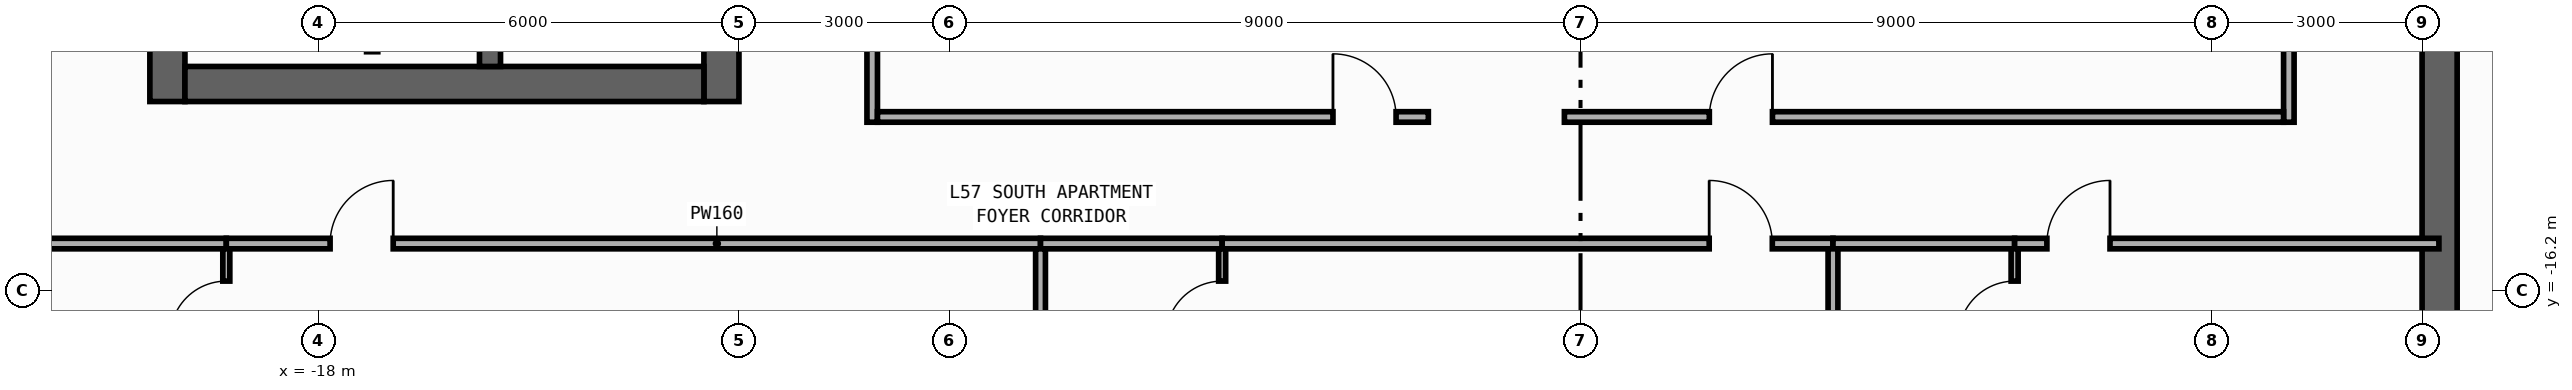
"""IFC4 building model, lengths in metres.
Left out: names, types, materials, properties, quantities, classifications, styles, units other than length and angle.
Written with IfcOpenShell. Run it as: python <this file> out.ifc"""

import sys

from ifc_helpers import new_model, si_unit, direction, frame, frame_2d, origin, place, context, subcontext, project, spatial, rectangle, extrude, element, fill, save


model = new_model("IFC4")
c1 = context("Model", 3, precision=1e-05, world=origin(), true_north=direction((0.0, 1.0)))
c2 = subcontext(c1, "Body", "Model", "MODEL_VIEW")
j1 = project(units=[si_unit("LENGTHUNIT", "METRE"), si_unit("PLANEANGLEUNIT", "RADIAN")], contexts=[c1])
p1 = place(None, origin())
s1 = spatial("IfcSite", under=j1, at=p1, CompositionType="ELEMENT")
p2 = place(p1, origin())
s2 = spatial("IfcBuilding", under=s1, at=p2, CompositionType="ELEMENT")
p3 = place(p2, frame((0.0, 0.0, 244.0)))
s3 = spatial("IfcBuildingStorey", under=s2, at=p3, CompositionType="ELEMENT", Elevation=244.0)
p4 = place(p3, frame((-20.15, -13.5, 0.0), z_axis=(0.0, 0.0, 1.0), x_axis=(0.0, 1.0, 0.0)))
e1 = element("IfcWall", 1, at=p4, inside=s3, PredefinedType="SHEAR", context=c2, shape_type="SweptSolid", body=[
    extrude(rectangle(XDim=27.0, YDim=0.5, at=frame_2d((13.5, 0.0))), origin(), (0.0, 0.0, 1.0), 3.34),
])
p5 = place(p3, frame((-12.25, -13.5, 0.0), z_axis=(0.0, 0.0, 1.0), x_axis=(0.0, 1.0, 0.0)))
e2 = element("IfcWall", 2, at=p5, inside=s3, PredefinedType="SHEAR", context=c2, shape_type="SweptSolid", body=[
    extrude(rectangle(XDim=27.0, YDim=0.5, at=frame_2d((13.5, 0.0))), origin(), (0.0, 0.0, 1.0), 3.34),
])
p6 = place(p5, frame((15.175, 0.0, 0.0)))
e3 = element("IfcOpeningElement", 3, at=p6, cuts=e2, PredefinedType="OPENING", context=c2, shape_type="SweptSolid", body=[
    extrude(rectangle(XDim=0.85, YDim=2.1, at=frame_2d((0.425, 1.05))), frame((0.0, 0.26, 0.0), z_axis=(0.0, -1.0, 0.0), x_axis=(1.0, 0.0, 0.0)), (0.0, 0.0, 1.0), 0.52),
])
p7 = place(p5, frame((21.275, 0.0, 0.0)))
e4 = element("IfcOpeningElement", 4, at=p7, cuts=e2, PredefinedType="OPENING", context=c2, shape_type="SweptSolid", body=[
    extrude(rectangle(XDim=0.85, YDim=2.1, at=frame_2d((0.425, 1.05))), frame((0.0, 0.26, 0.0), z_axis=(0.0, -1.0, 0.0), x_axis=(1.0, 0.0, 0.0)), (0.0, 0.0, 1.0), 0.52),
])
p8 = place(p5, frame((4.275, 0.0, 0.0)))
e5 = element("IfcOpeningElement", 5, at=p8, cuts=e2, PredefinedType="OPENING", context=c2, shape_type="SweptSolid", body=[
    extrude(rectangle(XDim=0.85, YDim=2.1, at=frame_2d((0.425, 1.05))), frame((0.0, 0.26, 0.0), z_axis=(0.0, -1.0, 0.0), x_axis=(1.0, 0.0, 0.0)), (0.0, 0.0, 1.0), 0.52),
])
p9 = place(p5, frame((10.275, 0.0, 0.0)))
e6 = element("IfcOpeningElement", 6, at=p9, cuts=e2, PredefinedType="OPENING", context=c2, shape_type="SweptSolid", body=[
    extrude(rectangle(XDim=0.85, YDim=2.1, at=frame_2d((0.425, 1.05))), frame((0.0, 0.26, 0.0), z_axis=(0.0, -1.0, 0.0), x_axis=(1.0, 0.0, 0.0)), (0.0, 0.0, 1.0), 0.52),
])
p10 = place(p5, frame((12.725, 0.0, 0.0)))
e7 = element("IfcOpeningElement", 7, at=p10, cuts=e2, PredefinedType="OPENING", context=c2, shape_type="SweptSolid", body=[
    extrude(rectangle(XDim=1.15, YDim=2.2, at=frame_2d((0.575, 1.1))), frame((0.0, 0.26, 0.0), z_axis=(0.0, -1.0, 0.0), x_axis=(1.0, 0.0, 0.0)), (0.0, 0.0, 1.0), 0.52),
])
p11 = place(p5, frame((1.625, 0.0, 0.0)))
e8 = element("IfcOpeningElement", 8, at=p11, cuts=e2, PredefinedType="OPENING", context=c2, shape_type="SweptSolid", body=[
    extrude(rectangle(XDim=0.85, YDim=2.1, at=frame_2d((0.425, 1.05))), frame((0.0, 0.26, 0.0), z_axis=(0.0, -1.0, 0.0), x_axis=(1.0, 0.0, 0.0)), (0.0, 0.0, 1.0), 0.52),
])
p12 = place(p3, frame((-19.9, -13.25, 0.0), z_axis=(0.0, 0.0, 1.0), x_axis=(1.0, 0.0, 0.0)))
e9 = element("IfcWall", 9, at=p12, inside=s3, PredefinedType="SHEAR", context=c2, shape_type="SweptSolid", body=[
    extrude(rectangle(XDim=7.4, YDim=0.5, at=frame_2d((3.7, 0.0))), origin(), (0.0, 0.0, 1.0), 3.34),
])
p13 = place(p3, frame((-15.55, -13.0, 0.0), z_axis=(0.0, 0.0, 1.0), x_axis=(0.0, 1.0, 0.0)))
e10 = element("IfcWall", 10, at=p13, inside=s3, PredefinedType="SHEAR", context=c2, shape_type="SweptSolid", body=[
    extrude(rectangle(XDim=26.0, YDim=0.3, at=frame_2d((13.0, 0.0))), origin(), (0.0, 0.0, 1.0), 3.34),
])
p14 = place(p13, frame((12.225, 0.0, 0.0)))
e11 = element("IfcOpeningElement", 11, at=p14, cuts=e10, PredefinedType="OPENING", context=c2, shape_type="SweptSolid", body=[
    extrude(rectangle(XDim=1.15, YDim=2.2, at=frame_2d((0.575, 1.1))), frame((0.0, 0.16, 0.0), z_axis=(0.0, -1.0, 0.0), x_axis=(1.0, 0.0, 0.0)), (0.0, 0.0, 1.0), 0.32),
])
p15 = place(p13, frame((1.125, 0.0, 0.0)))
e12 = element("IfcOpeningElement", 12, at=p15, cuts=e10, PredefinedType="OPENING", context=c2, shape_type="SweptSolid", body=[
    extrude(rectangle(XDim=0.85, YDim=2.1, at=frame_2d((0.425, 1.05))), frame((0.0, 0.16, 0.0), z_axis=(0.0, -1.0, 0.0), x_axis=(1.0, 0.0, 0.0)), (0.0, 0.0, 1.0), 0.32),
])
p16 = place(p3, frame((12.25, -19.8, 0.0), z_axis=(0.0, 0.0, 1.0), x_axis=(0.0, 1.0, 0.0)))
e13 = element("IfcWall", 13, at=p16, inside=s3, PredefinedType="SHEAR", context=c2, shape_type="SweptSolid", body=[
    extrude(rectangle(XDim=27.0, YDim=0.5, at=frame_2d((13.5, 0.0))), origin(), (0.0, 0.0, 1.0), 3.34),
])
p17 = place(p16, frame((23.05, 0.0, 0.0)))
e14 = element("IfcOpeningElement", 14, at=p17, cuts=e13, PredefinedType="OPENING", context=c2, shape_type="SweptSolid", body=[
    extrude(rectangle(XDim=1.1, YDim=2.2, at=frame_2d((0.55, 1.1))), frame((0.0, 0.26, 0.0), z_axis=(0.0, -1.0, 0.0), x_axis=(1.0, 0.0, 0.0)), (0.0, 0.0, 1.0), 0.52),
])
p18 = place(p16, frame((19.85, 0.0, 0.0)))
e15 = element("IfcOpeningElement", 15, at=p18, cuts=e13, PredefinedType="OPENING", context=c2, shape_type="SweptSolid", body=[
    extrude(rectangle(XDim=1.1, YDim=2.2, at=frame_2d((0.55, 1.1))), frame((0.0, 0.26, 0.0), z_axis=(0.0, -1.0, 0.0), x_axis=(1.0, 0.0, 0.0)), (0.0, 0.0, 1.0), 0.52),
])
p19 = place(p16, frame((16.65, 0.0, 0.0)))
e16 = element("IfcOpeningElement", 16, at=p19, cuts=e13, PredefinedType="OPENING", context=c2, shape_type="SweptSolid", body=[
    extrude(rectangle(XDim=1.1, YDim=2.2, at=frame_2d((0.55, 1.1))), frame((0.0, 0.26, 0.0), z_axis=(0.0, -1.0, 0.0), x_axis=(1.0, 0.0, 0.0)), (0.0, 0.0, 1.0), 0.52),
])
p20 = place(p16, frame((10.175, 0.0, 0.0)))
e17 = element("IfcOpeningElement", 17, at=p20, cuts=e13, PredefinedType="OPENING", context=c2, shape_type="SweptSolid", body=[
    extrude(rectangle(XDim=0.85, YDim=2.1, at=frame_2d((0.425, 1.05))), frame((0.0, 0.26, 0.0), z_axis=(0.0, -1.0, 0.0), x_axis=(1.0, 0.0, 0.0)), (0.0, 0.0, 1.0), 0.52),
])
p21 = place(p16, frame((12.725, 0.0, 0.0)))
e18 = element("IfcOpeningElement", 18, at=p21, cuts=e13, PredefinedType="OPENING", context=c2, shape_type="SweptSolid", body=[
    extrude(rectangle(XDim=1.15, YDim=2.2, at=frame_2d((0.575, 1.1))), frame((0.0, 0.26, 0.0), z_axis=(0.0, -1.0, 0.0), x_axis=(1.0, 0.0, 0.0)), (0.0, 0.0, 1.0), 0.52),
])
p22 = place(p16, frame((25.125, 0.0, 0.0)))
e19 = element("IfcOpeningElement", 19, at=p22, cuts=e13, PredefinedType="OPENING", context=c2, shape_type="SweptSolid", body=[
    extrude(rectangle(XDim=0.85, YDim=2.1, at=frame_2d((0.425, 1.05))), frame((0.0, 0.26, 0.0), z_axis=(0.0, -1.0, 0.0), x_axis=(1.0, 0.0, 0.0)), (0.0, 0.0, 1.0), 0.52),
])
p23 = place(p3, frame((-10.1, -13.795, 0.0), z_axis=(0.0, 0.0, 1.0), x_axis=(0.0, 1.0, 0.0)))
e20 = element("IfcWall", 20, at=p23, inside=s3, PredefinedType="PARTITIONING", context=c2, shape_type="SweptSolid", body=[
    extrude(rectangle(XDim=11.205, YDim=0.15, at=frame_2d((5.603, 0.0))), origin(), (0.0, 0.0, 1.0), 3.34),
])
p24 = place(p23, frame((8.009, 0.0, 0.0)))
e21 = element("IfcOpeningElement", 21, at=p24, cuts=e20, PredefinedType="OPENING", context=c2, shape_type="SweptSolid", body=[
    extrude(rectangle(XDim=0.9, YDim=2.15, at=frame_2d((0.45, 1.075))), frame((0.0, 0.085, 0.0), z_axis=(0.0, -1.0, 0.0), x_axis=(1.0, 0.0, 0.0)), (0.0, 0.0, 1.0), 0.17),
])
p25 = place(p3, frame((10.1, -13.795, 0.0), z_axis=(0.0, 0.0, 1.0), x_axis=(0.0, 1.0, 0.0)))
e22 = element("IfcWall", 22, at=p25, inside=s3, PredefinedType="PARTITIONING", context=c2, shape_type="SweptSolid", body=[
    extrude(rectangle(XDim=8.575, YDim=0.15, at=frame_2d((4.288, 0.0))), origin(), (0.0, 0.0, 1.0), 3.34),
])
p26 = place(p25, frame((7.215, 0.0, 0.0)))
e23 = element("IfcOpeningElement", 23, at=p26, cuts=e22, PredefinedType="OPENING", context=c2, shape_type="SweptSolid", body=[
    extrude(rectangle(XDim=0.9, YDim=2.15, at=frame_2d((0.45, 1.075))), frame((0.0, 0.085, 0.0), z_axis=(0.0, -1.0, 0.0), x_axis=(1.0, 0.0, 0.0)), (0.0, 0.0, 1.0), 0.17),
])
p27 = place(p3, frame((-21.955, -15.525, 0.0), z_axis=(0.0, 0.0, 1.0), x_axis=(1.0, 0.0, 0.0)))
e24 = element("IfcWall", 24, at=p27, inside=s3, PredefinedType="PARTITIONING", context=c2, shape_type="SweptSolid", body=[
    extrude(rectangle(XDim=2.645, YDim=0.15, at=frame_2d((1.323, 0.0))), origin(), (0.0, 0.0, 1.0), 3.34),
])
p28 = place(p3, frame((-19.31, -15.525, 0.0), z_axis=(0.0, 0.0, 1.0), x_axis=(1.0, 0.0, 0.0)))
e25 = element("IfcWall", 25, at=p28, inside=s3, PredefinedType="PARTITIONING", context=c2, shape_type="SweptSolid", body=[
    extrude(rectangle(XDim=11.61, YDim=0.15, at=frame_2d((5.805, 0.0))), origin(), (0.0, 0.0, 1.0), 3.34),
])
p29 = place(p28, frame((1.48, 0.0, 0.0)))
e26 = element("IfcOpeningElement", 26, at=p29, cuts=e25, PredefinedType="OPENING", context=c2, shape_type="SweptSolid", body=[
    extrude(rectangle(XDim=0.9, YDim=2.15, at=frame_2d((0.45, 1.075))), frame((0.0, 0.085, 0.0), z_axis=(0.0, -1.0, 0.0), x_axis=(1.0, 0.0, 0.0)), (0.0, 0.0, 1.0), 0.17),
])
p30 = place(p3, frame((-7.7, -15.525, 0.0), z_axis=(0.0, 0.0, 1.0), x_axis=(1.0, 0.0, 0.0)))
e27 = element("IfcWall", 27, at=p30, inside=s3, PredefinedType="PARTITIONING", context=c2, shape_type="SweptSolid", body=[
    extrude(rectangle(XDim=2.59, YDim=0.15, at=frame_2d((1.295, 0.0))), origin(), (0.0, 0.0, 1.0), 3.34),
])
p31 = place(p3, frame((-5.11, -15.525, 0.0), z_axis=(0.0, 0.0, 1.0), x_axis=(1.0, 0.0, 0.0)))
e28 = element("IfcWall", 28, at=p31, inside=s3, PredefinedType="PARTITIONING", context=c2, shape_type="SweptSolid", body=[
    extrude(rectangle(XDim=8.71, YDim=0.15, at=frame_2d((4.355, 0.0))), origin(), (0.0, 0.0, 1.0), 3.34),
])
p32 = place(p31, frame((6.945, 0.0, 0.0)))
e29 = element("IfcOpeningElement", 29, at=p32, cuts=e28, PredefinedType="OPENING", context=c2, shape_type="SweptSolid", body=[
    extrude(rectangle(XDim=0.9, YDim=2.15, at=frame_2d((0.45, 1.075))), frame((0.0, 0.085, 0.0), z_axis=(0.0, -1.0, 0.0), x_axis=(1.0, 0.0, 0.0)), (0.0, 0.0, 1.0), 0.17),
])
p33 = place(p3, frame((3.6, -15.525, 0.0), z_axis=(0.0, 0.0, 1.0), x_axis=(1.0, 0.0, 0.0)))
e30 = element("IfcWall", 30, at=p33, inside=s3, PredefinedType="PARTITIONING", context=c2, shape_type="SweptSolid", body=[
    extrude(rectangle(XDim=2.59, YDim=0.15, at=frame_2d((1.295, 0.0))), origin(), (0.0, 0.0, 1.0), 3.34),
])
p34 = place(p3, frame((6.19, -15.525, 0.0), z_axis=(0.0, 0.0, 1.0), x_axis=(1.0, 0.0, 0.0)))
e31 = element("IfcWall", 31, at=p34, inside=s3, PredefinedType="PARTITIONING", context=c2, shape_type="SweptSolid", body=[
    extrude(rectangle(XDim=6.05, YDim=0.15, at=frame_2d((3.025, 0.0))), origin(), (0.0, 0.0, 1.0), 3.34),
])
p35 = place(p34, frame((0.46, 0.0, 0.0)))
e32 = element("IfcOpeningElement", 32, at=p35, cuts=e31, PredefinedType="OPENING", context=c2, shape_type="SweptSolid", body=[
    extrude(rectangle(XDim=0.9, YDim=2.15, at=frame_2d((0.45, 1.075))), frame((0.0, 0.085, 0.0), z_axis=(0.0, -1.0, 0.0), x_axis=(1.0, 0.0, 0.0)), (0.0, 0.0, 1.0), 0.17),
])
p36 = place(p3, frame((-10.025, -13.72, 0.0), z_axis=(0.0, 0.0, 1.0), x_axis=(1.0, 0.0, 0.0)))
e33 = element("IfcWall", 33, at=p36, inside=s3, PredefinedType="PARTITIONING", context=c2, shape_type="SweptSolid", body=[
    extrude(rectangle(XDim=7.855, YDim=0.15, at=frame_2d((3.927, 0.0))), origin(), (0.0, 0.0, 1.0), 3.34),
])
p37 = place(p36, frame((6.495, 0.0, 0.0)))
e34 = element("IfcOpeningElement", 34, at=p37, cuts=e33, PredefinedType="OPENING", context=c2, shape_type="SweptSolid", body=[
    extrude(rectangle(XDim=0.9, YDim=2.15, at=frame_2d((0.45, 1.075))), frame((0.0, 0.085, 0.0), z_axis=(0.0, -1.0, 0.0), x_axis=(1.0, 0.0, 0.0)), (0.0, 0.0, 1.0), 0.17),
])
p38 = place(p3, frame((-0.23, -13.72, 0.0), z_axis=(0.0, 0.0, 1.0), x_axis=(1.0, 0.0, 0.0)))
e35 = element("IfcWall", 35, at=p38, inside=s3, PredefinedType="PARTITIONING", context=c2, shape_type="SweptSolid", body=[
    extrude(rectangle(XDim=10.255, YDim=0.15, at=frame_2d((5.127, 0.0))), origin(), (0.0, 0.0, 1.0), 3.34),
])
p39 = place(p38, frame((2.067, 0.0, 0.0)))
e36 = element("IfcOpeningElement", 36, at=p39, cuts=e35, PredefinedType="OPENING", context=c2, shape_type="SweptSolid", body=[
    extrude(rectangle(XDim=0.9, YDim=2.15, at=frame_2d((0.45, 1.075))), frame((0.0, 0.085, 0.0), z_axis=(0.0, -1.0, 0.0), x_axis=(1.0, 0.0, 0.0)), (0.0, 0.0, 1.0), 0.17),
])
p40 = place(p3, frame((-19.31, -18.1, 0.0), z_axis=(0.0, 0.0, 1.0), x_axis=(0.0, 1.0, 0.0)))
e37 = element("IfcWall", 37, at=p40, inside=s3, PredefinedType="PARTITIONING", context=c2, shape_type="SweptSolid", body=[
    extrude(rectangle(XDim=2.5, YDim=0.1, at=frame_2d((1.25, 0.0))), origin(), (0.0, 0.0, 1.0), 3.34),
])
p41 = place(p40, frame((1.24, 0.0, 0.0)))
e38 = element("IfcOpeningElement", 38, at=p41, cuts=e37, PredefinedType="OPENING", context=c2, shape_type="SweptSolid", body=[
    extrude(rectangle(XDim=0.8, YDim=2.1, at=frame_2d((0.4, 1.05))), frame((0.0, 0.06, 0.0), z_axis=(0.0, -1.0, 0.0), x_axis=(1.0, 0.0, 0.0)), (0.0, 0.0, 1.0), 0.12),
])
p42 = place(p3, frame((-7.7, -18.1, 0.0), z_axis=(0.0, 0.0, 1.0), x_axis=(0.0, 1.0, 0.0)))
e39 = element("IfcWall", 39, at=p42, inside=s3, PredefinedType="PARTITIONING", context=c2, shape_type="SweptSolid", body=[
    extrude(rectangle(XDim=2.5, YDim=0.14, at=frame_2d((1.25, 0.0))), origin(), (0.0, 0.0, 1.0), 3.34),
])
p43 = place(p3, frame((-5.11, -18.1, 0.0), z_axis=(0.0, 0.0, 1.0), x_axis=(0.0, 1.0, 0.0)))
e40 = element("IfcWall", 40, at=p43, inside=s3, PredefinedType="PARTITIONING", context=c2, shape_type="SweptSolid", body=[
    extrude(rectangle(XDim=2.5, YDim=0.1, at=frame_2d((1.25, 0.0))), origin(), (0.0, 0.0, 1.0), 3.34),
])
p44 = place(p43, frame((1.24, 0.0, 0.0)))
e41 = element("IfcOpeningElement", 41, at=p44, cuts=e40, PredefinedType="OPENING", context=c2, shape_type="SweptSolid", body=[
    extrude(rectangle(XDim=0.8, YDim=2.1, at=frame_2d((0.4, 1.05))), frame((0.0, 0.06, 0.0), z_axis=(0.0, -1.0, 0.0), x_axis=(1.0, 0.0, 0.0)), (0.0, 0.0, 1.0), 0.12),
])
p45 = place(p3, frame((3.6, -18.1, 0.0), z_axis=(0.0, 0.0, 1.0), x_axis=(0.0, 1.0, 0.0)))
e42 = element("IfcWall", 42, at=p45, inside=s3, PredefinedType="PARTITIONING", context=c2, shape_type="SweptSolid", body=[
    extrude(rectangle(XDim=2.5, YDim=0.14, at=frame_2d((1.25, 0.0))), origin(), (0.0, 0.0, 1.0), 3.34),
])
p46 = place(p3, frame((6.19, -18.1, 0.0), z_axis=(0.0, 0.0, 1.0), x_axis=(0.0, 1.0, 0.0)))
e43 = element("IfcWall", 43, at=p46, inside=s3, PredefinedType="PARTITIONING", context=c2, shape_type="SweptSolid", body=[
    extrude(rectangle(XDim=2.5, YDim=0.1, at=frame_2d((1.25, 0.0))), origin(), (0.0, 0.0, 1.0), 3.34),
])
p47 = place(p46, frame((1.24, 0.0, 0.0)))
e44 = element("IfcOpeningElement", 44, at=p47, cuts=e43, PredefinedType="OPENING", context=c2, shape_type="SweptSolid", body=[
    extrude(rectangle(XDim=0.8, YDim=2.1, at=frame_2d((0.4, 1.05))), frame((0.0, 0.06, 0.0), z_axis=(0.0, -1.0, 0.0), x_axis=(1.0, 0.0, 0.0)), (0.0, 0.0, 1.0), 0.12),
])
p48 = place(p29, origin())
e45 = element("IfcDoor", 45, at=p48, inside=s3, OperationType="SINGLE_SWING_RIGHT", PredefinedType="DOOR", context=c2, shape_type="SweptSolid", body=[
    extrude(rectangle(XDim=0.9, YDim=2.15, at=frame_2d((0.45, 1.075))), frame((0.0, 0.025, 0.0), z_axis=(0.0, -1.0, 0.0), x_axis=(1.0, 0.0, 0.0)), (0.0, 0.0, 1.0), 0.05),
])
fill(e26, e45)
p49 = place(p32, origin())
e46 = element("IfcDoor", 46, at=p49, inside=s3, OperationType="SINGLE_SWING_LEFT", PredefinedType="DOOR", context=c2, shape_type="SweptSolid", body=[
    extrude(rectangle(XDim=0.9, YDim=2.15, at=frame_2d((0.45, 1.075))), frame((0.0, 0.025, 0.0), z_axis=(0.0, -1.0, 0.0), x_axis=(1.0, 0.0, 0.0)), (0.0, 0.0, 1.0), 0.05),
])
fill(e29, e46)
p50 = place(p35, origin())
e47 = element("IfcDoor", 47, at=p50, inside=s3, OperationType="SINGLE_SWING_RIGHT", PredefinedType="DOOR", context=c2, shape_type="SweptSolid", body=[
    extrude(rectangle(XDim=0.9, YDim=2.15, at=frame_2d((0.45, 1.075))), frame((0.0, 0.025, 0.0), z_axis=(0.0, -1.0, 0.0), x_axis=(1.0, 0.0, 0.0)), (0.0, 0.0, 1.0), 0.05),
])
fill(e32, e47)
p51 = place(p37, origin())
e48 = element("IfcDoor", 48, at=p51, inside=s3, OperationType="SINGLE_SWING_LEFT", PredefinedType="DOOR", context=c2, shape_type="SweptSolid", body=[
    extrude(rectangle(XDim=0.9, YDim=2.15, at=frame_2d((0.45, 1.075))), frame((0.0, 0.025, 0.0), z_axis=(0.0, -1.0, 0.0), x_axis=(1.0, 0.0, 0.0)), (0.0, 0.0, 1.0), 0.05),
])
fill(e34, e48)
p52 = place(p39, origin())
e49 = element("IfcDoor", 49, at=p52, inside=s3, OperationType="SINGLE_SWING_RIGHT", PredefinedType="DOOR", context=c2, shape_type="SweptSolid", body=[
    extrude(rectangle(XDim=0.9, YDim=2.15, at=frame_2d((0.45, 1.075))), frame((0.0, 0.025, 0.0), z_axis=(0.0, -1.0, 0.0), x_axis=(1.0, 0.0, 0.0)), (0.0, 0.0, 1.0), 0.05),
])
fill(e36, e49)
p53 = place(p41, origin())
e50 = element("IfcDoor", 50, at=p53, inside=s3, OperationType="SINGLE_SWING_LEFT", PredefinedType="DOOR", context=c2, shape_type="SweptSolid", body=[
    extrude(rectangle(XDim=0.8, YDim=2.1, at=frame_2d((0.4, 1.05))), frame((0.0, 0.025, 0.0), z_axis=(0.0, -1.0, 0.0), x_axis=(1.0, 0.0, 0.0)), (0.0, 0.0, 1.0), 0.05),
])
fill(e38, e50)
p54 = place(p44, origin())
e51 = element("IfcDoor", 51, at=p54, inside=s3, OperationType="SINGLE_SWING_LEFT", PredefinedType="DOOR", context=c2, shape_type="SweptSolid", body=[
    extrude(rectangle(XDim=0.8, YDim=2.1, at=frame_2d((0.4, 1.05))), frame((0.0, 0.025, 0.0), z_axis=(0.0, -1.0, 0.0), x_axis=(1.0, 0.0, 0.0)), (0.0, 0.0, 1.0), 0.05),
])
fill(e41, e51)
p55 = place(p47, origin())
e52 = element("IfcDoor", 52, at=p55, inside=s3, OperationType="SINGLE_SWING_LEFT", PredefinedType="DOOR", context=c2, shape_type="SweptSolid", body=[
    extrude(rectangle(XDim=0.8, YDim=2.1, at=frame_2d((0.4, 1.05))), frame((0.0, 0.025, 0.0), z_axis=(0.0, -1.0, 0.0), x_axis=(1.0, 0.0, 0.0)), (0.0, 0.0, 1.0), 0.05),
])
fill(e44, e52)
save(model, sys.argv[1])
